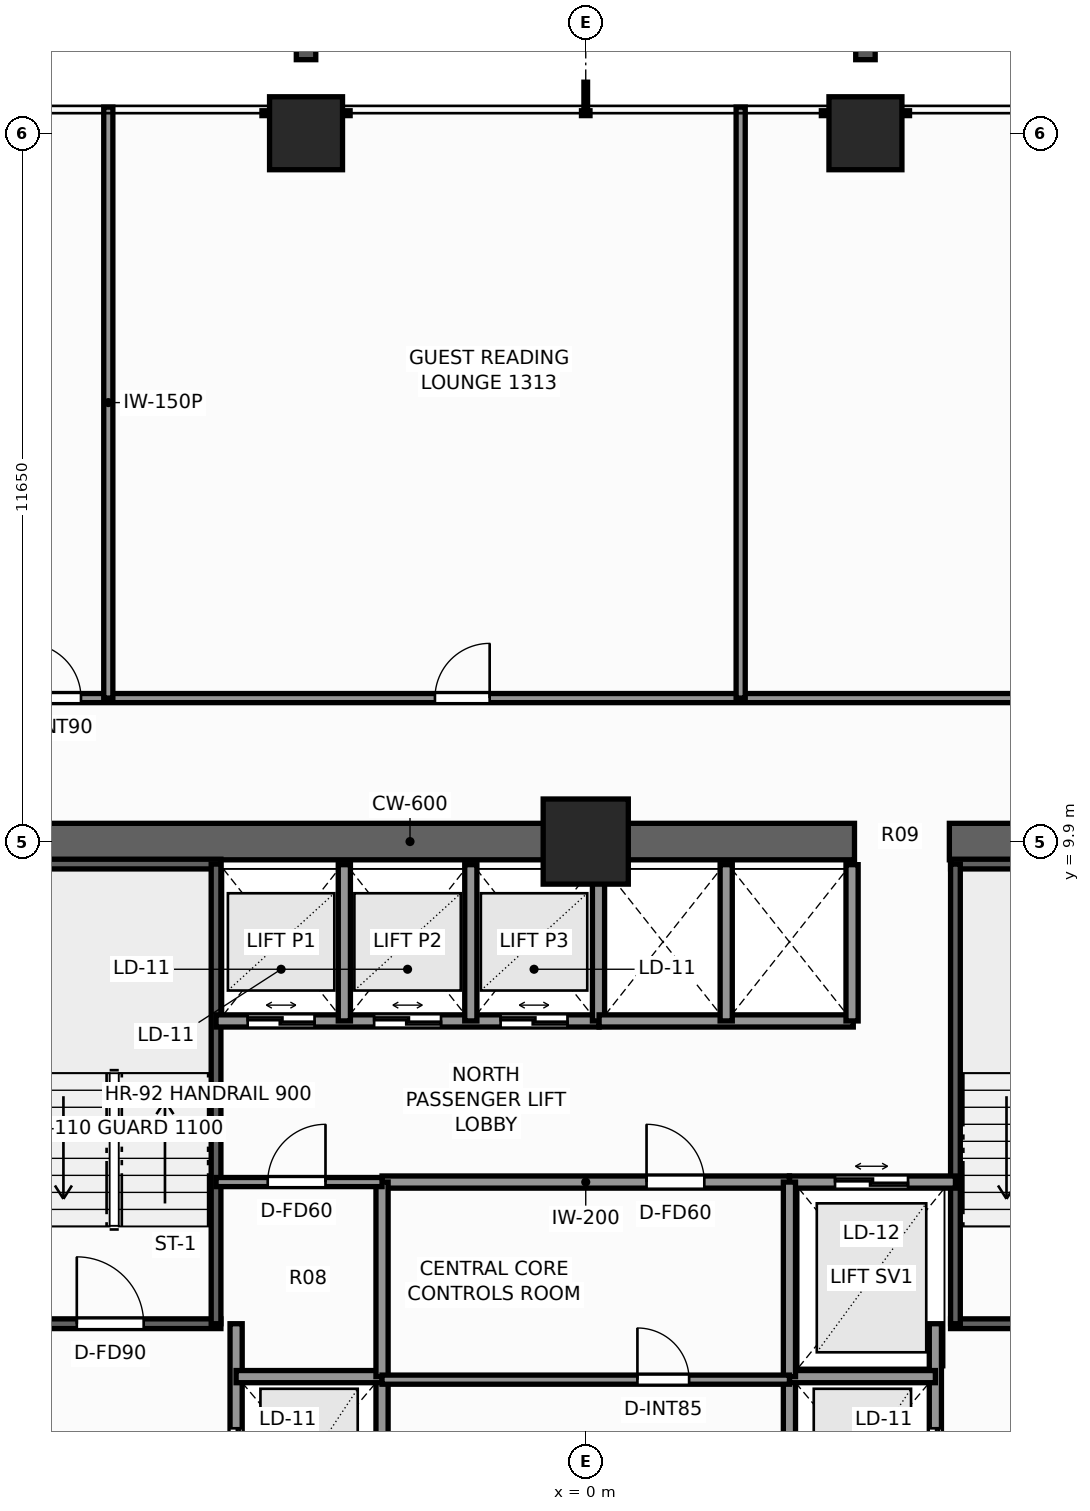
"""IFC4 building model, lengths in metres.
Left out: names, types, materials, properties, quantities, classifications, styles, units other than length and angle.
Written with IfcOpenShell. Run it as: python <this file> out.ifc"""

import sys

from ifc_helpers import new_model, si_unit, direction, frame, frame_2d, origin, origin_2d, place, context, subcontext, project, spatial, rectangle, extrude, element, fill, save


model = new_model("IFC4")
c1 = context("Model", 3, precision=1e-05, world=origin(), true_north=direction((0.0, 1.0)))
c2 = subcontext(c1, "Body", "Model", "MODEL_VIEW")
j1 = project(units=[si_unit("LENGTHUNIT", "METRE"), si_unit("PLANEANGLEUNIT", "RADIAN")], contexts=[c1])
p1 = place(None, origin())
s1 = spatial("IfcSite", under=j1, at=p1, CompositionType="ELEMENT")
p2 = place(p1, origin())
s2 = spatial("IfcBuilding", under=s1, at=p2, CompositionType="ELEMENT")
p3 = place(p2, frame((0.0, 0.0, 46.9)))
s3 = spatial("IfcBuildingStorey", under=s2, at=p3, CompositionType="ELEMENT", Elevation=46.9)
p4 = place(p3, frame((-10.2, 9.9, 0.0), z_axis=(0.0, 0.0, 1.0), x_axis=(1.0, 0.0, 0.0)))
e1 = element("IfcWall", 1, at=p4, inside=s3, PredefinedType="SHEAR", context=c2, shape_type="SweptSolid", body=[
    extrude(rectangle(XDim=14.62, YDim=0.6, at=frame_2d((7.31, 0.0))), origin(), (0.0, 0.0, 1.0), 3.3),
])
p5 = place(p3, frame((5.98, 9.9, 0.0), z_axis=(0.0, 0.0, 1.0), x_axis=(1.0, 0.0, 0.0)))
e2 = element("IfcWall", 2, at=p5, inside=s3, PredefinedType="SHEAR", context=c2, shape_type="SweptSolid", body=[
    extrude(rectangle(XDim=4.22, YDim=0.6, at=frame_2d((2.11, 0.0))), origin(), (0.0, 0.0, 1.0), 3.3),
])
p6 = place(p3, frame((0.0, 9.9, 0.0), z_axis=(0.0, 0.0, 1.0), x_axis=(1.0, 0.0, 0.0)))
e3 = element("IfcColumn", 3, at=p6, inside=s3, PredefinedType="COLUMN", context=c2, shape_type="SweptSolid", body=[
    extrude(rectangle(XDim=1.4, YDim=1.4, at=origin_2d()), origin(), (0.0, 0.0, 1.0), 3.3),
])
for number, where, z_axis, x_axis in (
    (4, (-4.6, 21.55, 0.0), (0.0, 0.0, 1.0), (1.0, 0.0, 0.0)),
    (5, (4.6, 21.55, 0.0), (0.0, 0.0, 1.0), (1.0, 0.0, 0.0)),
):
    element("IfcColumn", number, at=place(p3, frame(where, z_axis=z_axis, x_axis=x_axis)), inside=s3, PredefinedType="COLUMN", context=c2, shape_type="SweptSolid", body=[
        extrude(rectangle(XDim=1.2, YDim=1.2, at=origin_2d()), origin(), (0.0, 0.0, 1.0), 3.3),
    ])
p7 = place(p3, frame((-9.52, 1.97, 0.0), z_axis=(0.0, 0.0, 1.0), x_axis=(1.0, 0.0, 0.0)))
e6 = element("IfcWall", 6, at=p7, inside=s3, PredefinedType="SHEAR", context=c2, shape_type="SweptSolid", body=[
    extrude(rectangle(XDim=3.52, YDim=0.16, at=frame_2d((1.76, 0.0))), origin(), (0.0, 0.0, 1.0), 3.3),
])
p8 = place(p7, frame((1.15, 0.0, 0.0)))
e7 = element("IfcOpeningElement", 7, at=p8, cuts=e6, PredefinedType="OPENING", context=c2, shape_type="SweptSolid", body=[
    extrude(rectangle(XDim=1.1, YDim=2.2, at=frame_2d((0.55, 1.1))), frame((0.0, 0.09, 0.0), z_axis=(0.0, -1.0, 0.0), x_axis=(1.0, 0.0, 0.0)), (0.0, 0.0, 1.0), 0.18),
])
p9 = place(p3, frame((-9.52, 9.53, 0.0), z_axis=(0.0, 0.0, 1.0), x_axis=(1.0, 0.0, 0.0)))
e8 = element("IfcWall", 8, at=p9, inside=s3, PredefinedType="SHEAR", context=c2, shape_type="SweptSolid", body=[
    extrude(rectangle(XDim=3.52, YDim=0.16, at=frame_2d((1.76, 0.0))), origin(), (0.0, 0.0, 1.0), 3.3),
])
p10 = place(p3, frame((-6.08, 1.97, 0.0), z_axis=(0.0, 0.0, 1.0), x_axis=(0.0, 1.0, 0.0)))
e9 = element("IfcWall", 9, at=p10, inside=s3, PredefinedType="SHEAR", context=c2, shape_type="SweptSolid", body=[
    extrude(rectangle(XDim=7.56, YDim=0.16, at=frame_2d((3.78, 0.0))), origin(), (0.0, 0.0, 1.0), 3.3),
])
p11 = place(p3, frame((6.0, 1.97, 0.0), z_axis=(0.0, 0.0, 1.0), x_axis=(1.0, 0.0, 0.0)))
e10 = element("IfcWall", 10, at=p11, inside=s3, PredefinedType="SHEAR", context=c2, shape_type="SweptSolid", body=[
    extrude(rectangle(XDim=3.52, YDim=0.16, at=frame_2d((1.76, 0.0))), origin(), (0.0, 0.0, 1.0), 3.3),
])
p12 = place(p11, frame((1.15, 0.0, 0.0)))
e11 = element("IfcOpeningElement", 11, at=p12, cuts=e10, PredefinedType="OPENING", context=c2, shape_type="SweptSolid", body=[
    extrude(rectangle(XDim=1.1, YDim=2.2, at=frame_2d((0.55, 1.1))), frame((0.0, 0.09, 0.0), z_axis=(0.0, -1.0, 0.0), x_axis=(1.0, 0.0, 0.0)), (0.0, 0.0, 1.0), 0.18),
])
p13 = place(p3, frame((6.0, 9.53, 0.0), z_axis=(0.0, 0.0, 1.0), x_axis=(1.0, 0.0, 0.0)))
e12 = element("IfcWall", 12, at=p13, inside=s3, PredefinedType="SHEAR", context=c2, shape_type="SweptSolid", body=[
    extrude(rectangle(XDim=3.52, YDim=0.16, at=frame_2d((1.76, 0.0))), origin(), (0.0, 0.0, 1.0), 3.3),
])
p14 = place(p3, frame((6.08, 1.97, 0.0), z_axis=(0.0, 0.0, 1.0), x_axis=(0.0, 1.0, 0.0)))
e13 = element("IfcWall", 13, at=p14, inside=s3, PredefinedType="SHEAR", context=c2, shape_type="SweptSolid", body=[
    extrude(rectangle(XDim=7.56, YDim=0.16, at=frame_2d((3.78, 0.0))), origin(), (0.0, 0.0, 1.0), 3.3),
])
p15 = place(p3, frame((-5.75, -3.6, 0.0), z_axis=(0.0, 0.0, 1.0), x_axis=(0.0, 1.0, 0.0)))
e14 = element("IfcWall", 14, at=p15, inside=s3, PredefinedType="SOLIDWALL", context=c2, shape_type="SweptSolid", body=[
    extrude(rectangle(XDim=5.57, YDim=0.2, at=frame_2d((2.785, 0.0))), origin(), (0.0, 0.0, 1.0), 3.06),
])
p16 = place(p15, frame((2.75, 0.0, 0.0)))
e15 = element("IfcOpeningElement", 15, at=p16, cuts=e14, PredefinedType="OPENING", context=c2, shape_type="SweptSolid", body=[
    extrude(rectangle(XDim=1.1, YDim=2.2, at=frame_2d((0.55, 1.1))), frame((0.0, 0.11, 0.0), z_axis=(0.0, -1.0, 0.0), x_axis=(1.0, 0.0, 0.0)), (0.0, 0.0, 1.0), 0.22),
])
p17 = place(p3, frame((-3.35, -1.7, 0.0), z_axis=(0.0, 0.0, 1.0), x_axis=(0.0, 1.0, 0.0)))
e16 = element("IfcWall", 16, at=p17, inside=s3, PredefinedType="SOLIDWALL", context=c2, shape_type="SweptSolid", body=[
    extrude(rectangle(XDim=2.8, YDim=0.2, at=frame_2d((1.4, 0.0))), origin(), (0.0, 0.0, 1.0), 3.06),
])
p18 = place(p3, frame((-5.75, 1.1, 0.0), z_axis=(0.0, 0.0, 1.0), x_axis=(1.0, 0.0, 0.0)))
e17 = element("IfcWall", 17, at=p18, inside=s3, PredefinedType="SOLIDWALL", context=c2, shape_type="SweptSolid", body=[
    extrude(rectangle(XDim=2.4, YDim=0.2, at=frame_2d((1.2, 0.0))), origin(), (0.0, 0.0, 1.0), 3.06),
])
p19 = place(p3, frame((5.75, -3.6, 0.0), z_axis=(0.0, 0.0, 1.0), x_axis=(0.0, 1.0, 0.0)))
e18 = element("IfcWall", 18, at=p19, inside=s3, PredefinedType="SOLIDWALL", context=c2, shape_type="SweptSolid", body=[
    extrude(rectangle(XDim=5.57, YDim=0.2, at=frame_2d((2.785, 0.0))), origin(), (0.0, 0.0, 1.0), 3.06),
])
p20 = place(p19, frame((2.75, 0.0, 0.0)))
e19 = element("IfcOpeningElement", 19, at=p20, cuts=e18, PredefinedType="OPENING", context=c2, shape_type="SweptSolid", body=[
    extrude(rectangle(XDim=1.1, YDim=2.2, at=frame_2d((0.55, 1.1))), frame((0.0, 0.11, 0.0), z_axis=(0.0, -1.0, 0.0), x_axis=(1.0, 0.0, 0.0)), (0.0, 0.0, 1.0), 0.22),
])
p21 = place(p3, frame((3.35, -1.7, 0.0), z_axis=(0.0, 0.0, 1.0), x_axis=(0.0, 1.0, 0.0)))
e20 = element("IfcWall", 20, at=p21, inside=s3, PredefinedType="SOLIDWALL", context=c2, shape_type="SweptSolid", body=[
    extrude(rectangle(XDim=2.8, YDim=0.2, at=frame_2d((1.4, 0.0))), origin(), (0.0, 0.0, 1.0), 3.06),
])
p22 = place(p3, frame((3.35, 1.1, 0.0), z_axis=(0.0, 0.0, 1.0), x_axis=(1.0, 0.0, 0.0)))
e21 = element("IfcWall", 21, at=p22, inside=s3, PredefinedType="SOLIDWALL", context=c2, shape_type="SweptSolid", body=[
    extrude(rectangle(XDim=2.4, YDim=0.2, at=frame_2d((1.2, 0.0))), origin(), (0.0, 0.0, 1.0), 3.06),
])
p23 = place(p3, frame((3.35, 4.3, 0.0), z_axis=(0.0, 0.0, 1.0), x_axis=(1.0, 0.0, 0.0)))
e22 = element("IfcWall", 22, at=p23, inside=s3, PredefinedType="SOLIDWALL", context=c2, shape_type="SweptSolid", body=[
    extrude(rectangle(XDim=2.73, YDim=0.2, at=frame_2d((1.365, 0.0))), origin(), (0.0, 0.0, 1.0), 3.06),
])
p24 = place(p23, frame((0.75, 0.0, 0.0)))
e23 = element("IfcOpeningElement", 23, at=p24, cuts=e22, PredefinedType="OPENING", context=c2, shape_type="SweptSolid", body=[
    extrude(rectangle(XDim=1.2, YDim=2.25, at=frame_2d((0.6, 1.125))), frame((0.0, 0.11, 0.0), z_axis=(0.0, -1.0, 0.0), x_axis=(1.0, 0.0, 0.0)), (0.0, 0.0, 1.0), 0.22),
])
p25 = place(p3, frame((-6.08, 6.95, 0.0), z_axis=(0.0, 0.0, 1.0), x_axis=(1.0, 0.0, 0.0)))
e24 = element("IfcWall", 24, at=p25, inside=s3, PredefinedType="SOLIDWALL", context=c2, shape_type="SweptSolid", body=[
    extrude(rectangle(XDim=6.3, YDim=0.2, at=frame_2d((3.15, 0.0))), origin(), (0.0, 0.0, 1.0), 3.06),
])
p26 = place(p25, frame((0.52, 0.0, 0.0)))
e25 = element("IfcOpeningElement", 25, at=p26, cuts=e24, PredefinedType="OPENING", context=c2, shape_type="SweptSolid", body=[
    extrude(rectangle(XDim=1.1, YDim=2.2, at=frame_2d((0.55, 1.1))), frame((0.0, 0.11, 0.0), z_axis=(0.0, -1.0, 0.0), x_axis=(1.0, 0.0, 0.0)), (0.0, 0.0, 1.0), 0.22),
])
p27 = place(p25, frame((2.6, 0.0, 0.0)))
e26 = element("IfcOpeningElement", 26, at=p27, cuts=e24, PredefinedType="OPENING", context=c2, shape_type="SweptSolid", body=[
    extrude(rectangle(XDim=1.1, YDim=2.2, at=frame_2d((0.55, 1.1))), frame((0.0, 0.11, 0.0), z_axis=(0.0, -1.0, 0.0), x_axis=(1.0, 0.0, 0.0)), (0.0, 0.0, 1.0), 0.22),
])
p28 = place(p25, frame((4.68, 0.0, 0.0)))
e27 = element("IfcOpeningElement", 27, at=p28, cuts=e24, PredefinedType="OPENING", context=c2, shape_type="SweptSolid", body=[
    extrude(rectangle(XDim=1.1, YDim=2.2, at=frame_2d((0.55, 1.1))), frame((0.0, 0.11, 0.0), z_axis=(0.0, -1.0, 0.0), x_axis=(1.0, 0.0, 0.0)), (0.0, 0.0, 1.0), 0.22),
])
for number, where, z_axis, x_axis in (
    (28, (-3.97, 6.95, 0.0), (0.0, 0.0, 1.0), (0.0, 1.0, 0.0)),
    (29, (-1.89, 6.95, 0.0), (0.0, 0.0, 1.0), (0.0, 1.0, 0.0)),
    (30, (0.21, 6.95, 0.0), (0.0, 0.0, 1.0), (0.0, 1.0, 0.0)),
):
    element("IfcWall", number, at=place(p3, frame(where, z_axis=z_axis, x_axis=x_axis)), inside=s3, PredefinedType="SOLIDWALL", context=c2, shape_type="SweptSolid", body=[
        extrude(rectangle(XDim=2.57, YDim=0.2, at=frame_2d((1.285, 0.0))), origin(), (0.0, 0.0, 1.0), 3.06),
    ])
p29 = place(p3, frame((0.22, 6.95, 0.0), z_axis=(0.0, 0.0, 1.0), x_axis=(1.0, 0.0, 0.0)))
e31 = element("IfcWall", 31, at=p29, inside=s3, PredefinedType="SOLIDWALL", context=c2, shape_type="SweptSolid", body=[
    extrude(rectangle(XDim=4.18, YDim=0.2, at=frame_2d((2.09, 0.0))), origin(), (0.0, 0.0, 1.0), 3.06),
])
for number, where, z_axis, x_axis in (
    (32, (4.38, 6.95, 0.0), (0.0, 0.0, 1.0), (0.0, 1.0, 0.0)),
    (33, (2.31, 6.95, 0.0), (0.0, 0.0, 1.0), (0.0, 1.0, 0.0)),
):
    element("IfcWall", number, at=place(p3, frame(where, z_axis=z_axis, x_axis=x_axis)), inside=s3, PredefinedType="SOLIDWALL", context=c2, shape_type="SweptSolid", body=[
        extrude(rectangle(XDim=2.57, YDim=0.2, at=frame_2d((1.285, 0.0))), origin(), (0.0, 0.0, 1.0), 3.06),
    ])
p30 = place(p3, frame((-3.35, 4.3, 0.0), z_axis=(0.0, 0.0, 1.0), x_axis=(1.0, 0.0, 0.0)))
e34 = element("IfcWall", 34, at=p30, inside=s3, PredefinedType="SOLIDWALL", context=c2, shape_type="SweptSolid", body=[
    extrude(rectangle(XDim=6.7, YDim=0.2, at=frame_2d((3.35, 0.0))), origin(), (0.0, 0.0, 1.0), 3.06),
])
p31 = place(p30, frame((4.35, 0.0, 0.0)))
e35 = element("IfcOpeningElement", 35, at=p31, cuts=e34, PredefinedType="OPENING", context=c2, shape_type="SweptSolid", body=[
    extrude(rectangle(XDim=0.95, YDim=2.06, at=frame_2d((0.475, 1.03))), frame((0.0, 0.11, 0.0), z_axis=(0.0, -1.0, 0.0), x_axis=(1.0, 0.0, 0.0)), (0.0, 0.0, 1.0), 0.22),
])
for number, where, z_axis, x_axis in (
    (36, (-3.35, 1.1, 0.0), (0.0, 0.0, 1.0), (0.0, 1.0, 0.0)),
    (37, (3.35, 1.1, 0.0), (0.0, 0.0, 1.0), (0.0, 1.0, 0.0)),
):
    element("IfcWall", number, at=place(p3, frame(where, z_axis=z_axis, x_axis=x_axis)), inside=s3, PredefinedType="SOLIDWALL", context=c2, shape_type="SweptSolid", body=[
        extrude(rectangle(XDim=3.2, YDim=0.2, at=frame_2d((1.6, 0.0))), origin(), (0.0, 0.0, 1.0), 3.06),
    ])
p32 = place(p3, frame((-3.35, 1.05, 0.0), z_axis=(0.0, 0.0, 1.0), x_axis=(1.0, 0.0, 0.0)))
e38 = element("IfcWall", 38, at=p32, inside=s3, PredefinedType="PARTITIONING", context=c2, shape_type="SweptSolid", body=[
    extrude(rectangle(XDim=6.7, YDim=0.15, at=frame_2d((3.35, 0.0))), origin(), (0.0, 0.0, 1.0), 3.06),
])
p33 = place(p32, frame((4.2, 0.0, 0.0)))
e39 = element("IfcOpeningElement", 39, at=p33, cuts=e38, PredefinedType="OPENING", context=c2, shape_type="SweptSolid", body=[
    extrude(rectangle(XDim=0.85, YDim=2.03, at=frame_2d((0.425, 1.015))), frame((0.0, 0.085, 0.0), z_axis=(0.0, -1.0, 0.0), x_axis=(1.0, 0.0, 0.0)), (0.0, 0.0, 1.0), 0.17),
])
p34 = place(p3, frame((-6.08, 4.3, 0.0), z_axis=(0.0, 0.0, 1.0), x_axis=(1.0, 0.0, 0.0)))
e40 = element("IfcWall", 40, at=p34, inside=s3, PredefinedType="PARTITIONING", context=c2, shape_type="SweptSolid", body=[
    extrude(rectangle(XDim=2.73, YDim=0.15, at=frame_2d((1.365, 0.0))), origin(), (0.0, 0.0, 1.0), 3.06),
])
p35 = place(p34, frame((0.85, 0.0, 0.0)))
e41 = element("IfcOpeningElement", 41, at=p35, cuts=e40, PredefinedType="OPENING", context=c2, shape_type="SweptSolid", body=[
    extrude(rectangle(XDim=0.95, YDim=2.06, at=frame_2d((0.475, 1.03))), frame((0.0, 0.085, 0.0), z_axis=(0.0, -1.0, 0.0), x_axis=(1.0, 0.0, 0.0)), (0.0, 0.0, 1.0), 0.17),
])
p36 = place(p3, frame((-12.58, 12.26, 0.0), z_axis=(0.0, 0.0, 1.0), x_axis=(1.0, 0.0, 0.0)))
e42 = element("IfcWall", 42, at=p36, inside=s3, PredefinedType="PARTITIONING", context=c2, shape_type="SweptSolid", body=[
    extrude(rectangle(XDim=25.0, YDim=0.15, at=frame_2d((12.5, 0.0))), origin(), (0.0, 0.0, 1.0), 2.272),
])
p37 = place(p36, frame((3.379, 0.0, 0.0)))
e43 = element("IfcOpeningElement", 43, at=p37, cuts=e42, PredefinedType="OPENING", context=c2, shape_type="SweptSolid", body=[
    extrude(rectangle(XDim=0.9, YDim=2.06, at=frame_2d((0.45, 1.03))), frame((0.0, 0.085, 0.0), z_axis=(0.0, -1.0, 0.0), x_axis=(1.0, 0.0, 0.0)), (0.0, 0.0, 1.0), 0.17),
])
p38 = place(p36, frame((10.1, 0.0, 0.0)))
e44 = element("IfcOpeningElement", 44, at=p38, cuts=e42, PredefinedType="OPENING", context=c2, shape_type="SweptSolid", body=[
    extrude(rectangle(XDim=0.9, YDim=2.06, at=frame_2d((0.45, 1.03))), frame((0.0, 0.085, 0.0), z_axis=(0.0, -1.0, 0.0), x_axis=(1.0, 0.0, 0.0)), (0.0, 0.0, 1.0), 0.17),
])
p39 = place(p36, frame((19.665, 0.0, 0.0)))
e45 = element("IfcOpeningElement", 45, at=p39, cuts=e42, PredefinedType="OPENING", context=c2, shape_type="SweptSolid", body=[
    extrude(rectangle(XDim=0.9, YDim=2.06, at=frame_2d((0.45, 1.03))), frame((0.0, 0.085, 0.0), z_axis=(0.0, -1.0, 0.0), x_axis=(1.0, 0.0, 0.0)), (0.0, 0.0, 1.0), 0.17),
])
for number, where, z_axis, x_axis in (
    (46, (-7.852, 12.26, 0.0), (0.0, 0.0, 1.0), (0.0, 1.0, 0.0)),
    (47, (2.548, 12.26, 0.0), (0.0, 0.0, 1.0), (0.0, 1.0, 0.0)),
):
    element("IfcWall", number, at=place(p3, frame(where, z_axis=z_axis, x_axis=x_axis)), inside=s3, PredefinedType="PARTITIONING", context=c2, shape_type="SweptSolid", body=[
        extrude(rectangle(XDim=9.72, YDim=0.15, at=frame_2d((4.86, 0.0))), origin(), (0.0, 0.0, 1.0), 2.429),
    ])
p40 = place(p8, origin())
e48 = element("IfcDoor", 48, at=p40, inside=s3, OperationType="SINGLE_SWING_LEFT", PredefinedType="DOOR", context=c2, shape_type="SweptSolid", body=[
    extrude(rectangle(XDim=1.1, YDim=2.2, at=frame_2d((0.55, 1.1))), frame((0.0, 0.025, 0.0), z_axis=(0.0, -1.0, 0.0), x_axis=(1.0, 0.0, 0.0)), (0.0, 0.0, 1.0), 0.05),
])
fill(e7, e48)
p41 = place(p16, origin())
e49 = element("IfcDoor", 49, at=p41, inside=s3, OperationType="DOUBLE_DOOR_SLIDING", PredefinedType="DOOR", context=c2, shape_type="SweptSolid", body=[
    extrude(rectangle(XDim=1.1, YDim=2.2, at=frame_2d((0.55, 1.1))), frame((0.0, 0.025, 0.0), z_axis=(0.0, -1.0, 0.0), x_axis=(1.0, 0.0, 0.0)), (0.0, 0.0, 1.0), 0.05),
])
fill(e15, e49)
p42 = place(p20, origin())
e50 = element("IfcDoor", 50, at=p42, inside=s3, OperationType="DOUBLE_DOOR_SLIDING", PredefinedType="DOOR", context=c2, shape_type="SweptSolid", body=[
    extrude(rectangle(XDim=1.1, YDim=2.2, at=frame_2d((0.55, 1.1))), frame((0.0, 0.025, 0.0), z_axis=(0.0, -1.0, 0.0), x_axis=(1.0, 0.0, 0.0)), (0.0, 0.0, 1.0), 0.05),
])
fill(e19, e50)
p43 = place(p24, origin())
e51 = element("IfcDoor", 51, at=p43, inside=s3, OperationType="DOUBLE_DOOR_SLIDING", PredefinedType="DOOR", context=c2, shape_type="SweptSolid", body=[
    extrude(rectangle(XDim=1.2, YDim=2.25, at=frame_2d((0.6, 1.125))), frame((0.0, 0.025, 0.0), z_axis=(0.0, -1.0, 0.0), x_axis=(1.0, 0.0, 0.0)), (0.0, 0.0, 1.0), 0.05),
])
fill(e23, e51)
p44 = place(p26, origin())
e52 = element("IfcDoor", 52, at=p44, inside=s3, OperationType="DOUBLE_DOOR_SLIDING", PredefinedType="DOOR", context=c2, shape_type="SweptSolid", body=[
    extrude(rectangle(XDim=1.1, YDim=2.2, at=frame_2d((0.55, 1.1))), frame((0.0, 0.025, 0.0), z_axis=(0.0, -1.0, 0.0), x_axis=(1.0, 0.0, 0.0)), (0.0, 0.0, 1.0), 0.05),
])
fill(e25, e52)
p45 = place(p27, origin())
e53 = element("IfcDoor", 53, at=p45, inside=s3, OperationType="DOUBLE_DOOR_SLIDING", PredefinedType="DOOR", context=c2, shape_type="SweptSolid", body=[
    extrude(rectangle(XDim=1.1, YDim=2.2, at=frame_2d((0.55, 1.1))), frame((0.0, 0.025, 0.0), z_axis=(0.0, -1.0, 0.0), x_axis=(1.0, 0.0, 0.0)), (0.0, 0.0, 1.0), 0.05),
])
fill(e26, e53)
p46 = place(p28, origin())
e54 = element("IfcDoor", 54, at=p46, inside=s3, OperationType="DOUBLE_DOOR_SLIDING", PredefinedType="DOOR", context=c2, shape_type="SweptSolid", body=[
    extrude(rectangle(XDim=1.1, YDim=2.2, at=frame_2d((0.55, 1.1))), frame((0.0, 0.025, 0.0), z_axis=(0.0, -1.0, 0.0), x_axis=(1.0, 0.0, 0.0)), (0.0, 0.0, 1.0), 0.05),
])
fill(e27, e54)
p47 = place(p31, origin())
e55 = element("IfcDoor", 55, at=p47, inside=s3, OperationType="SINGLE_SWING_LEFT", PredefinedType="DOOR", context=c2, shape_type="SweptSolid", body=[
    extrude(rectangle(XDim=0.95, YDim=2.06, at=frame_2d((0.475, 1.03))), frame((0.0, 0.025, 0.0), z_axis=(0.0, -1.0, 0.0), x_axis=(1.0, 0.0, 0.0)), (0.0, 0.0, 1.0), 0.05),
])
fill(e35, e55)
p48 = place(p33, origin())
e56 = element("IfcDoor", 56, at=p48, inside=s3, OperationType="SINGLE_SWING_LEFT", PredefinedType="DOOR", context=c2, shape_type="SweptSolid", body=[
    extrude(rectangle(XDim=0.85, YDim=2.03, at=frame_2d((0.425, 1.015))), frame((0.0, 0.025, 0.0), z_axis=(0.0, -1.0, 0.0), x_axis=(1.0, 0.0, 0.0)), (0.0, 0.0, 1.0), 0.05),
])
fill(e39, e56)
p49 = place(p35, origin())
e57 = element("IfcDoor", 57, at=p49, inside=s3, OperationType="SINGLE_SWING_RIGHT", PredefinedType="DOOR", context=c2, shape_type="SweptSolid", body=[
    extrude(rectangle(XDim=0.95, YDim=2.06, at=frame_2d((0.475, 1.03))), frame((0.0, 0.025, 0.0), z_axis=(0.0, -1.0, 0.0), x_axis=(1.0, 0.0, 0.0)), (0.0, 0.0, 1.0), 0.05),
])
fill(e41, e57)
p50 = place(p37, origin())
e58 = element("IfcDoor", 58, at=p50, inside=s3, OperationType="SINGLE_SWING_LEFT", PredefinedType="DOOR", context=c2, shape_type="SweptSolid", body=[
    extrude(rectangle(XDim=0.9, YDim=2.06, at=frame_2d((0.45, 1.03))), frame((0.0, 0.025, 0.0), z_axis=(0.0, -1.0, 0.0), x_axis=(1.0, 0.0, 0.0)), (0.0, 0.0, 1.0), 0.05),
])
fill(e43, e58)
p51 = place(p38, origin())
e59 = element("IfcDoor", 59, at=p51, inside=s3, OperationType="SINGLE_SWING_RIGHT", PredefinedType="DOOR", context=c2, shape_type="SweptSolid", body=[
    extrude(rectangle(XDim=0.9, YDim=2.06, at=frame_2d((0.45, 1.03))), frame((0.0, 0.025, 0.0), z_axis=(0.0, -1.0, 0.0), x_axis=(1.0, 0.0, 0.0)), (0.0, 0.0, 1.0), 0.05),
])
fill(e44, e59)
save(model, sys.argv[1])
